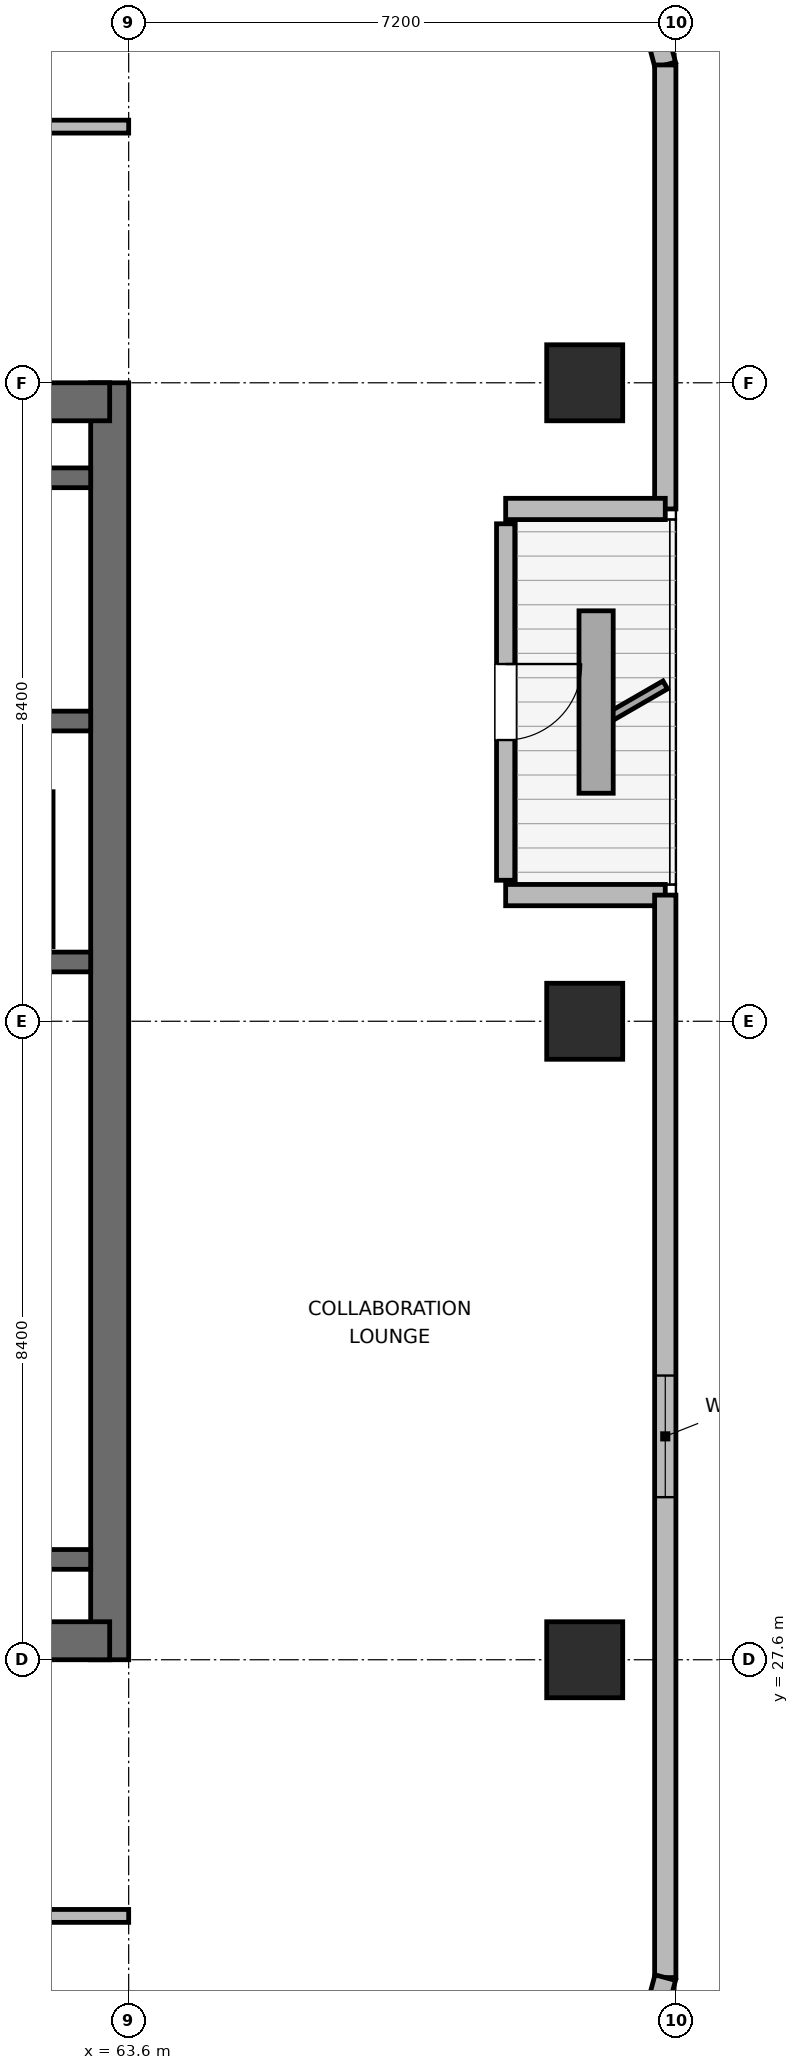
"""IFC4 building model, lengths in metres.
Left out: names, types, materials, properties, quantities, classifications, styles, units other than length and angle.
Written with IfcOpenShell. Run it as: python <this file> out.ifc"""

import sys

from ifc_helpers import new_model, si_unit, direction, frame, frame_2d, origin, origin_2d, place, context, subcontext, project, spatial, rectangle, extrude, element, fill, save


model = new_model("IFC4")
c1 = context("Model", 3, precision=1e-05, world=origin(), true_north=direction((0.0, 1.0)))
c2 = subcontext(c1, "Body", "Model", "MODEL_VIEW")
j1 = project(units=[si_unit("LENGTHUNIT", "METRE"), si_unit("PLANEANGLEUNIT", "RADIAN")], contexts=[c1])
p1 = place(None, origin())
s1 = spatial("IfcSite", under=j1, at=p1, CompositionType="ELEMENT")
p2 = place(p1, origin())
s2 = spatial("IfcBuilding", under=s1, at=p2, CompositionType="ELEMENT")
p3 = place(p2, frame((0.0, 0.0, 286.2)))
s3 = spatial("IfcBuildingStorey", under=s2, at=p3, CompositionType="ELEMENT", Elevation=286.2)
p4 = place(p3, frame((63.35, 27.6, 0.0), z_axis=(0.0, 0.0, 1.0), x_axis=(0.0, 1.0, 0.0)))
e1 = element("IfcWall", 1, at=p4, inside=s3, PredefinedType="SHEAR", context=c2, shape_type="SweptSolid", body=[
    extrude(rectangle(XDim=16.8, YDim=0.5, at=frame_2d((8.4, 0.0))), origin(), (0.0, 0.0, 1.0), 3.9),
])
p5 = place(p3, frame((53.85, 27.85, 0.0), z_axis=(0.0, 0.0, 1.0), x_axis=(1.0, 0.0, 0.0)))
e2 = element("IfcWall", 2, at=p5, inside=s3, PredefinedType="SHEAR", context=c2, shape_type="SweptSolid", body=[
    extrude(rectangle(XDim=9.5, YDim=0.5, at=frame_2d((4.75, 0.0))), origin(), (0.0, 0.0, 1.0), 3.9),
])
p6 = place(p5, frame((4.025, 0.0, 0.0)))
e3 = element("IfcOpeningElement", 3, at=p6, cuts=e2, PredefinedType="OPENING", context=c2, shape_type="SweptSolid", body=[
    extrude(rectangle(XDim=1.05, YDim=2.04, at=frame_2d((0.525, 1.02))), frame((0.0, 0.26, 0.0), z_axis=(0.0, -1.0, 0.0), x_axis=(1.0, 0.0, 0.0)), (0.0, 0.0, 1.0), 0.52),
])
p7 = place(p3, frame((53.85, 44.15, 0.0), z_axis=(0.0, 0.0, 1.0), x_axis=(1.0, 0.0, 0.0)))
e4 = element("IfcWall", 4, at=p7, inside=s3, PredefinedType="SHEAR", context=c2, shape_type="SweptSolid", body=[
    extrude(rectangle(XDim=9.5, YDim=0.5, at=frame_2d((4.75, 0.0))), origin(), (0.0, 0.0, 1.0), 3.9),
])
for number, where, z_axis, x_axis in (
    (5, (58.89, 28.92, 0.0), (0.0, 0.0, 1.0), (1.0, 0.0, 0.0)),
    (6, (58.89, 36.78, 0.0), (0.0, 0.0, 1.0), (1.0, 0.0, 0.0)),
):
    element("IfcWall", number, at=place(p3, frame(where, z_axis=z_axis, x_axis=x_axis)), inside=s3, PredefinedType="SHEAR", context=c2, shape_type="SweptSolid", body=[
        extrude(rectangle(XDim=4.21, YDim=0.26, at=frame_2d((2.105, 0.0))), origin(), (0.0, 0.0, 1.0), 3.9),
    ])
p8 = place(p3, frame((54.1, 39.95, 0.0), z_axis=(0.0, 0.0, 1.0), x_axis=(1.0, 0.0, 0.0)))
e7 = element("IfcWall", 7, at=p8, inside=s3, PredefinedType="SHEAR", context=c2, shape_type="SweptSolid", body=[
    extrude(rectangle(XDim=9.0, YDim=0.26, at=frame_2d((4.5, 0.0))), origin(), (0.0, 0.0, 1.0), 3.9),
])
p9 = place(p8, frame((1.1, 0.0, 0.0)))
e8 = element("IfcOpeningElement", 8, at=p9, cuts=e7, PredefinedType="OPENING", context=c2, shape_type="SweptSolid", body=[
    extrude(rectangle(XDim=1.0, YDim=2.04, at=frame_2d((0.5, 1.02))), frame((0.0, 0.14, 0.0), z_axis=(0.0, -1.0, 0.0), x_axis=(1.0, 0.0, 0.0)), (0.0, 0.0, 1.0), 0.28),
])
p10 = place(p3, frame((54.1, 43.15, 0.0), z_axis=(0.0, 0.0, 1.0), x_axis=(1.0, 0.0, 0.0)))
e9 = element("IfcWall", 9, at=p10, inside=s3, PredefinedType="SHEAR", context=c2, shape_type="SweptSolid", body=[
    extrude(rectangle(XDim=9.0, YDim=0.26, at=frame_2d((4.5, 0.0))), origin(), (0.0, 0.0, 1.0), 3.9),
])
for number, where, z_axis, x_axis in (
    (10, (69.6, 27.6, 0.0), (0.0, 0.0, 1.0), (1.0, 0.0, 0.0)),
    (11, (69.6, 36.0, 0.0), (0.0, 0.0, 1.0), (1.0, 0.0, 0.0)),
    (12, (69.6, 44.4, 0.0), (0.0, 0.0, 1.0), (1.0, 0.0, 0.0)),
):
    element("IfcColumn", number, at=place(p3, frame(where, z_axis=z_axis, x_axis=x_axis)), inside=s3, PredefinedType="COLUMN", context=c2, shape_type="SweptSolid", body=[
        extrude(rectangle(XDim=1.0, YDim=1.0, at=origin_2d()), origin(), (0.0, 0.0, 1.0), 3.9),
    ])
p11 = place(p3, frame((70.031, 50.927, 0.0), z_axis=(0.0, 0.0, 1.0), x_axis=(0.258751159445, -0.965944013639, 0.0)))
e13 = element("IfcWall", 13, at=p11, inside=s3, PredefinedType="SOLIDWALL", context=c2, shape_type="SweptSolid", body=[
    extrude(rectangle(XDim=2.429, YDim=0.28, at=frame_2d((1.214, 0.0))), origin(), (0.0, 0.0, 1.0), 3.68),
])
p12 = place(p3, frame((70.66, 48.582, 0.0), z_axis=(0.0, 0.0, 1.0), x_axis=(0.0, -1.0, 0.0)))
e14 = element("IfcWall", 14, at=p12, inside=s3, PredefinedType="SOLIDWALL", context=c2, shape_type="SweptSolid", body=[
    extrude(rectangle(XDim=5.842, YDim=0.28, at=frame_2d((2.921, 0.0))), origin(), (0.0, 0.0, 1.0), 3.68),
])
p13 = place(p3, frame((70.66, 42.74, 0.0), z_axis=(0.0, 0.0, 1.0), x_axis=(-1.0, 0.0, 0.0)))
e15 = element("IfcWall", 15, at=p13, inside=s3, PredefinedType="SOLIDWALL", context=c2, shape_type="SweptSolid", body=[
    extrude(rectangle(XDim=2.1, YDim=0.28, at=frame_2d((1.05, 0.0))), origin(), (0.0, 0.0, 1.0), 3.126),
])
p14 = place(p3, frame((68.56, 42.545, 0.0), z_axis=(0.0, 0.0, 1.0), x_axis=(0.0, -1.0, 0.0)))
e16 = element("IfcWall", 16, at=p14, inside=s3, PredefinedType="SOLIDWALL", context=c2, shape_type="SweptSolid", body=[
    extrude(rectangle(XDim=4.69, YDim=0.24, at=frame_2d((2.345, 0.0))), origin(), (0.0, 0.0, 1.0), 3.311),
])
p15 = place(p14, frame((1.845, 0.0, 0.0)))
e17 = element("IfcOpeningElement", 17, at=p15, cuts=e16, PredefinedType="OPENING", context=c2, shape_type="SweptSolid", body=[
    extrude(rectangle(XDim=1.0, YDim=2.02, at=frame_2d((0.5, 1.01))), frame((0.0, 0.13, 0.0), z_axis=(0.0, -1.0, 0.0), x_axis=(1.0, 0.0, 0.0)), (0.0, 0.0, 1.0), 0.26),
])
p16 = place(p3, frame((68.56, 37.66, 0.0), z_axis=(0.0, 0.0, 1.0), x_axis=(1.0, 0.0, 0.0)))
e18 = element("IfcWall", 18, at=p16, inside=s3, PredefinedType="SOLIDWALL", context=c2, shape_type="SweptSolid", body=[
    extrude(rectangle(XDim=2.1, YDim=0.28, at=frame_2d((1.05, 0.0))), origin(), (0.0, 0.0, 1.0), 3.126),
])
p17 = place(p3, frame((70.66, 37.66, 0.0), z_axis=(0.0, 0.0, 1.0), x_axis=(0.0, -1.0, 0.0)))
e19 = element("IfcWall", 19, at=p17, inside=s3, PredefinedType="SOLIDWALL", context=c2, shape_type="SweptSolid", body=[
    extrude(rectangle(XDim=14.241, YDim=0.28, at=frame_2d((7.121, 0.0))), origin(), (0.0, 0.0, 1.0), 3.68),
])
p18 = place(p17, frame((6.321, 0.0, 0.85)))
e20 = element("IfcOpeningElement", 20, at=p18, cuts=e19, PredefinedType="OPENING", context=c2, shape_type="SweptSolid", body=[
    extrude(rectangle(XDim=1.6, YDim=1.0, at=frame_2d((0.8, 0.5))), frame((0.0, 0.15, 0.0), z_axis=(0.0, -1.0, 0.0), x_axis=(1.0, 0.0, 0.0)), (0.0, 0.0, 1.0), 0.3),
])
p19 = place(p3, frame((70.66, 23.418, 0.0), z_axis=(0.0, 0.0, 1.0), x_axis=(-0.258751159445, -0.965944013639, 0.0)))
e21 = element("IfcWall", 21, at=p19, inside=s3, PredefinedType="SOLIDWALL", context=c2, shape_type="SweptSolid", body=[
    extrude(rectangle(XDim=2.429, YDim=0.28, at=frame_2d((1.214, 0.0))), origin(), (0.0, 0.0, 1.0), 3.68),
])
p20 = place(p3, frame((62.5, 36.98, 0.0), z_axis=(0.0, 0.0, 1.0), x_axis=(0.0, 1.0, 0.0)))
e22 = element("IfcWall", 22, at=p20, inside=s3, PredefinedType="PARTITIONING", context=c2, shape_type="SweptSolid", body=[
    extrude(rectangle(XDim=2.04, YDim=0.21, at=frame_2d((1.02, 0.0))), origin(), (0.0, 0.0, 1.0), 3.68),
])
p21 = place(p3, frame((29.25, 24.23, 0.0), z_axis=(0.0, 0.0, 1.0), x_axis=(1.0, 0.0, 0.0)))
e23 = element("IfcWall", 23, at=p21, inside=s3, PredefinedType="PARTITIONING", context=c2, shape_type="SweptSolid", body=[
    extrude(rectangle(XDim=34.35, YDim=0.17, at=frame_2d((17.175, 0.0))), origin(), (0.0, 0.0, 1.0), 3.68),
])
p22 = place(p21, frame((5.9, 0.0, 0.0)))
e24 = element("IfcOpeningElement", 24, at=p22, cuts=e23, PredefinedType="OPENING", context=c2, shape_type="SweptSolid", body=[
    extrude(rectangle(XDim=0.95, YDim=2.04, at=frame_2d((0.475, 1.02))), frame((0.0, 0.095, 0.0), z_axis=(0.0, -1.0, 0.0), x_axis=(1.0, 0.0, 0.0)), (0.0, 0.0, 1.0), 0.19),
])
p23 = place(p21, frame((23.075, 0.0, 0.0)))
e25 = element("IfcOpeningElement", 25, at=p23, cuts=e23, PredefinedType="OPENING", context=c2, shape_type="SweptSolid", body=[
    extrude(rectangle(XDim=0.95, YDim=2.04, at=frame_2d((0.475, 1.02))), frame((0.0, 0.095, 0.0), z_axis=(0.0, -1.0, 0.0), x_axis=(1.0, 0.0, 0.0)), (0.0, 0.0, 1.0), 0.19),
])
p24 = place(p3, frame((29.25, 47.77, 0.0), z_axis=(0.0, 0.0, 1.0), x_axis=(1.0, 0.0, 0.0)))
e26 = element("IfcWall", 26, at=p24, inside=s3, PredefinedType="PARTITIONING", context=c2, shape_type="SweptSolid", body=[
    extrude(rectangle(XDim=34.35, YDim=0.17, at=frame_2d((17.175, 0.0))), origin(), (0.0, 0.0, 1.0), 3.68),
])
p25 = place(p24, frame((8.4, 0.0, 0.0)))
e27 = element("IfcOpeningElement", 27, at=p25, cuts=e26, PredefinedType="OPENING", context=c2, shape_type="SweptSolid", body=[
    extrude(rectangle(XDim=0.95, YDim=2.04, at=frame_2d((0.475, 1.02))), frame((0.0, 0.095, 0.0), z_axis=(0.0, -1.0, 0.0), x_axis=(1.0, 0.0, 0.0)), (0.0, 0.0, 1.0), 0.19),
])
p26 = place(p24, frame((25.575, 0.0, 0.0)))
e28 = element("IfcOpeningElement", 28, at=p26, cuts=e26, PredefinedType="OPENING", context=c2, shape_type="SweptSolid", body=[
    extrude(rectangle(XDim=0.95, YDim=2.04, at=frame_2d((0.475, 1.02))), frame((0.0, 0.095, 0.0), z_axis=(0.0, -1.0, 0.0), x_axis=(1.0, 0.0, 0.0)), (0.0, 0.0, 1.0), 0.19),
])
p27 = place(p15, origin())
e29 = element("IfcDoor", 29, at=p27, inside=s3, OperationType="SINGLE_SWING_LEFT", PredefinedType="DOOR", context=c2, shape_type="SweptSolid", body=[
    extrude(rectangle(XDim=1.0, YDim=2.02, at=frame_2d((0.5, 1.01))), frame((0.0, 0.025, 0.0), z_axis=(0.0, -1.0, 0.0), x_axis=(1.0, 0.0, 0.0)), (0.0, 0.0, 1.0), 0.05),
])
fill(e17, e29)
p28 = place(p18, origin())
e30 = element("IfcWindow", 30, at=p28, inside=s3, PartitioningType="SINGLE_PANEL", PredefinedType="WINDOW", context=c2, shape_type="SweptSolid", body=[
    extrude(rectangle(XDim=1.6, YDim=1.0, at=frame_2d((0.8, 0.5))), frame((0.0, 0.03, 0.0), z_axis=(0.0, -1.0, 0.0), x_axis=(1.0, 0.0, 0.0)), (0.0, 0.0, 1.0), 0.06),
])
fill(e20, e30)
save(model, sys.argv[1])
